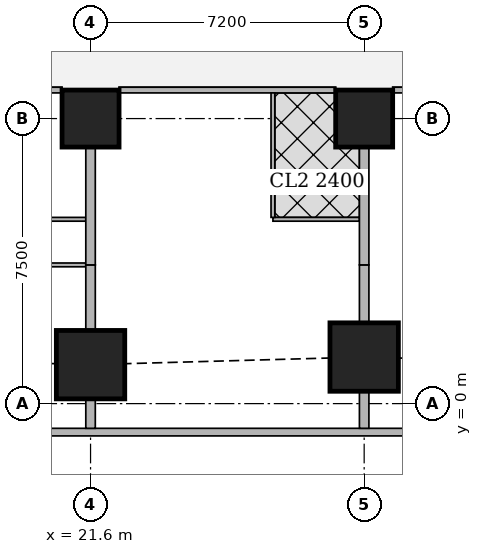
"""IFC4 building model, lengths in metres.
Left out: names, types, materials, properties, quantities, classifications, styles, units other than length and angle.
Written with IfcOpenShell. Run it as: python <this file> out.ifc"""

import sys

from ifc_helpers import new_model, si_unit, direction, frame, frame_2d, origin, origin_2d, place, context, subcontext, project, spatial, rectangle, extrude, element, fill, save


model = new_model("IFC4")
c1 = context("Model", 3, precision=1e-05, world=origin(), true_north=direction((0.0, 1.0)))
c2 = subcontext(c1, "Body", "Model", "MODEL_VIEW")
j1 = project(units=[si_unit("LENGTHUNIT", "METRE"), si_unit("PLANEANGLEUNIT", "RADIAN")], contexts=[c1])
p1 = place(None, origin())
s1 = spatial("IfcSite", under=j1, at=p1, CompositionType="ELEMENT")
p2 = place(p1, origin())
s2 = spatial("IfcBuilding", under=s1, at=p2, CompositionType="ELEMENT")
p3 = place(p2, frame((0.0, 0.0, 169.55)))
s3 = spatial("IfcBuildingStorey", under=s2, at=p3, CompositionType="ELEMENT", Elevation=169.55)
for number, where, z_axis, x_axis in (
    (1, (21.6, 1.025, 0.0), (0.0, 0.0, 1.0), (1.0, 0.0, 0.0)),
    (2, (28.8, 1.225, 0.0), (0.0, 0.0, 1.0), (1.0, 0.0, 0.0)),
):
    element("IfcColumn", number, at=place(p3, frame(where, z_axis=z_axis, x_axis=x_axis)), inside=s3, PredefinedType="COLUMN", context=c2, shape_type="SweptSolid", body=[
        extrude(rectangle(XDim=1.8, YDim=1.8, at=origin_2d()), origin(), (0.0, 0.0, 1.0), 3.75),
    ])
for number, where, z_axis, x_axis in (
    (3, (21.6, 7.5, 0.0), (0.0, 0.0, 1.0), (1.0, 0.0, 0.0)),
    (4, (28.8, 7.5, 0.0), (0.0, 0.0, 1.0), (1.0, 0.0, 0.0)),
):
    element("IfcColumn", number, at=place(p3, frame(where, z_axis=z_axis, x_axis=x_axis)), inside=s3, PredefinedType="COLUMN", context=c2, shape_type="SweptSolid", body=[
        extrude(rectangle(XDim=1.5, YDim=1.5, at=origin_2d()), origin(), (0.0, 0.0, 1.0), 3.75),
    ])
p4 = place(p3, frame((2.163, -0.75, 0.0), z_axis=(0.0, 0.0, 1.0), x_axis=(1.0, 0.0, 0.0)))
e5 = element("IfcWall", 5, at=p4, inside=s3, PredefinedType="SOLIDWALL", context=c2, shape_type="SweptSolid", body=[
    extrude(rectangle(XDim=45.628, YDim=0.2, at=frame_2d((22.814, 0.0))), origin(), (0.0, 0.0, 1.0), 3.5),
])
p5 = place(p4, frame((9.537, 0.0, 0.9)))
e6 = element("IfcOpeningElement", 6, at=p5, cuts=e5, PredefinedType="OPENING", context=c2, shape_type="SweptSolid", body=[
    extrude(rectangle(XDim=1.8, YDim=1.5, at=frame_2d((0.9, 0.75))), frame((0.0, 0.11, 0.0), z_axis=(0.0, -1.0, 0.0), x_axis=(1.0, 0.0, 0.0)), (0.0, 0.0, 1.0), 0.22),
])
p6 = place(p4, frame((13.137, 0.0, 0.9)))
e7 = element("IfcOpeningElement", 7, at=p6, cuts=e5, PredefinedType="OPENING", context=c2, shape_type="SweptSolid", body=[
    extrude(rectangle(XDim=1.8, YDim=1.5, at=frame_2d((0.9, 0.75))), frame((0.0, 0.11, 0.0), z_axis=(0.0, -1.0, 0.0), x_axis=(1.0, 0.0, 0.0)), (0.0, 0.0, 1.0), 0.22),
])
p7 = place(p4, frame((16.737, 0.0, 0.9)))
e8 = element("IfcOpeningElement", 8, at=p7, cuts=e5, PredefinedType="OPENING", context=c2, shape_type="SweptSolid", body=[
    extrude(rectangle(XDim=1.8, YDim=1.5, at=frame_2d((0.9, 0.75))), frame((0.0, 0.11, 0.0), z_axis=(0.0, -1.0, 0.0), x_axis=(1.0, 0.0, 0.0)), (0.0, 0.0, 1.0), 0.22),
])
p8 = place(p4, frame((20.337, 0.0, 0.9)))
e9 = element("IfcOpeningElement", 9, at=p8, cuts=e5, PredefinedType="OPENING", context=c2, shape_type="SweptSolid", body=[
    extrude(rectangle(XDim=1.8, YDim=1.5, at=frame_2d((0.9, 0.75))), frame((0.0, 0.11, 0.0), z_axis=(0.0, -1.0, 0.0), x_axis=(1.0, 0.0, 0.0)), (0.0, 0.0, 1.0), 0.22),
])
p9 = place(p4, frame((23.937, 0.0, 0.9)))
e10 = element("IfcOpeningElement", 10, at=p9, cuts=e5, PredefinedType="OPENING", context=c2, shape_type="SweptSolid", body=[
    extrude(rectangle(XDim=1.8, YDim=1.5, at=frame_2d((0.9, 0.75))), frame((0.0, 0.11, 0.0), z_axis=(0.0, -1.0, 0.0), x_axis=(1.0, 0.0, 0.0)), (0.0, 0.0, 1.0), 0.22),
])
p10 = place(p4, frame((27.537, 0.0, 0.9)))
e11 = element("IfcOpeningElement", 11, at=p10, cuts=e5, PredefinedType="OPENING", context=c2, shape_type="SweptSolid", body=[
    extrude(rectangle(XDim=1.8, YDim=1.5, at=frame_2d((0.9, 0.75))), frame((0.0, 0.11, 0.0), z_axis=(0.0, -1.0, 0.0), x_axis=(1.0, 0.0, 0.0)), (0.0, 0.0, 1.0), 0.22),
])
p11 = place(p4, frame((31.137, 0.0, 0.9)))
e12 = element("IfcOpeningElement", 12, at=p11, cuts=e5, PredefinedType="OPENING", context=c2, shape_type="SweptSolid", body=[
    extrude(rectangle(XDim=1.8, YDim=1.5, at=frame_2d((0.9, 0.75))), frame((0.0, 0.11, 0.0), z_axis=(0.0, -1.0, 0.0), x_axis=(1.0, 0.0, 0.0)), (0.0, 0.0, 1.0), 0.22),
])
p12 = place(p4, frame((34.737, 0.0, 0.9)))
e13 = element("IfcOpeningElement", 13, at=p12, cuts=e5, PredefinedType="OPENING", context=c2, shape_type="SweptSolid", body=[
    extrude(rectangle(XDim=1.8, YDim=1.5, at=frame_2d((0.9, 0.75))), frame((0.0, 0.11, 0.0), z_axis=(0.0, -1.0, 0.0), x_axis=(1.0, 0.0, 0.0)), (0.0, 0.0, 1.0), 0.22),
])
p13 = place(p3, frame((35.249, 8.25, 0.0), z_axis=(0.0, 0.0, 1.0), x_axis=(-1.0, 0.0, 0.0)))
e14 = element("IfcWall", 14, at=p13, inside=s3, PredefinedType="SOLIDWALL", context=c2, shape_type="SweptSolid", body=[
    extrude(rectangle(XDim=5.698, YDim=0.15, at=frame_2d((2.849, 0.0))), origin(), (0.0, 0.0, 1.0), 3.5),
])
p14 = place(p13, frame((3.549, 0.0, 0.0)))
e15 = element("IfcOpeningElement", 15, at=p14, cuts=e14, PredefinedType="OPENING", context=c2, shape_type="SweptSolid", body=[
    extrude(rectangle(XDim=1.0, YDim=2.1, at=frame_2d((0.5, 1.05))), frame((0.0, 0.085, 0.0), z_axis=(0.0, -1.0, 0.0), x_axis=(1.0, 0.0, 0.0)), (0.0, 0.0, 1.0), 0.17),
])
p15 = place(p3, frame((28.049, 8.25, 0.0), z_axis=(0.0, 0.0, 1.0), x_axis=(-1.0, 0.0, 0.0)))
e16 = element("IfcWall", 16, at=p15, inside=s3, PredefinedType="SOLIDWALL", context=c2, shape_type="SweptSolid", body=[
    extrude(rectangle(XDim=5.698, YDim=0.15, at=frame_2d((2.849, 0.0))), origin(), (0.0, 0.0, 1.0), 3.5),
])
p16 = place(p15, frame((3.549, 0.0, 0.0)))
e17 = element("IfcOpeningElement", 17, at=p16, cuts=e16, PredefinedType="OPENING", context=c2, shape_type="SweptSolid", body=[
    extrude(rectangle(XDim=1.0, YDim=2.1, at=frame_2d((0.5, 1.05))), frame((0.0, 0.085, 0.0), z_axis=(0.0, -1.0, 0.0), x_axis=(1.0, 0.0, 0.0)), (0.0, 0.0, 1.0), 0.17),
])
p17 = place(p3, frame((20.849, 8.25, 0.0), z_axis=(0.0, 0.0, 1.0), x_axis=(-1.0, 0.0, 0.0)))
e18 = element("IfcWall", 18, at=p17, inside=s3, PredefinedType="SOLIDWALL", context=c2, shape_type="SweptSolid", body=[
    extrude(rectangle(XDim=5.698, YDim=0.15, at=frame_2d((2.849, 0.0))), origin(), (0.0, 0.0, 1.0), 3.5),
])
p18 = place(p3, frame((21.475, 3.65, 0.0), z_axis=(0.0, 0.0, 1.0), x_axis=(-1.0, 0.0, 0.0)))
e19 = element("IfcWall", 19, at=p18, inside=s3, PredefinedType="PARTITIONING", context=c2, shape_type="SweptSolid", body=[
    extrude(rectangle(XDim=7.075, YDim=0.1, at=frame_2d((3.538, 0.0))), origin(), (0.0, 0.0, 1.0), 3.5),
])
p19 = place(p18, frame((5.975, 0.0, 0.0)))
e20 = element("IfcOpeningElement", 20, at=p19, cuts=e19, PredefinedType="OPENING", context=c2, shape_type="SweptSolid", body=[
    extrude(rectangle(XDim=0.9, YDim=2.1, at=frame_2d((0.45, 1.05))), frame((0.0, 0.06, 0.0), z_axis=(0.0, -1.0, 0.0), x_axis=(1.0, 0.0, 0.0)), (0.0, 0.0, 1.0), 0.12),
])
p20 = place(p18, frame((2.375, 0.0, 0.0)))
e21 = element("IfcOpeningElement", 21, at=p20, cuts=e19, PredefinedType="OPENING", context=c2, shape_type="SweptSolid", body=[
    extrude(rectangle(XDim=0.9, YDim=2.1, at=frame_2d((0.45, 1.05))), frame((0.0, 0.06, 0.0), z_axis=(0.0, -1.0, 0.0), x_axis=(1.0, 0.0, 0.0)), (0.0, 0.0, 1.0), 0.12),
])
p21 = place(p3, frame((21.475, 4.85, 0.0), z_axis=(0.0, 0.0, 1.0), x_axis=(-1.0, 0.0, 0.0)))
e22 = element("IfcWall", 22, at=p21, inside=s3, PredefinedType="PARTITIONING", context=c2, shape_type="SweptSolid", body=[
    extrude(rectangle(XDim=7.075, YDim=0.1, at=frame_2d((3.538, 0.0))), origin(), (0.0, 0.0, 1.0), 3.5),
])
p22 = place(p21, frame((5.52, 0.0, 0.0)))
e23 = element("IfcOpeningElement", 23, at=p22, cuts=e22, PredefinedType="OPENING", context=c2, shape_type="SweptSolid", body=[
    extrude(rectangle(XDim=0.9, YDim=2.1, at=frame_2d((0.45, 1.05))), frame((0.0, 0.06, 0.0), z_axis=(0.0, -1.0, 0.0), x_axis=(1.0, 0.0, 0.0)), (0.0, 0.0, 1.0), 0.12),
])
p23 = place(p21, frame((0.625, 0.0, 0.0)))
e24 = element("IfcOpeningElement", 24, at=p23, cuts=e22, PredefinedType="OPENING", context=c2, shape_type="SweptSolid", body=[
    extrude(rectangle(XDim=0.9, YDim=2.1, at=frame_2d((0.45, 1.05))), frame((0.0, 0.06, 0.0), z_axis=(0.0, -1.0, 0.0), x_axis=(1.0, 0.0, 0.0)), (0.0, 0.0, 1.0), 0.12),
])
p24 = place(p21, frame((3.121, 0.0, 0.0)))
e25 = element("IfcOpeningElement", 25, at=p24, cuts=e22, PredefinedType="OPENING", context=c2, shape_type="SweptSolid", body=[
    extrude(rectangle(XDim=0.9, YDim=2.1, at=frame_2d((0.45, 1.05))), frame((0.0, 0.06, 0.0), z_axis=(0.0, -1.0, 0.0), x_axis=(1.0, 0.0, 0.0)), (0.0, 0.0, 1.0), 0.12),
])
p25 = place(p3, frame((28.675, 4.85, 0.0), z_axis=(0.0, 0.0, 1.0), x_axis=(-1.0, 0.0, 0.0)))
e26 = element("IfcWall", 26, at=p25, inside=s3, PredefinedType="PARTITIONING", context=c2, shape_type="SweptSolid", body=[
    extrude(rectangle(XDim=2.276, YDim=0.1, at=frame_2d((1.138, 0.0))), origin(), (0.0, 0.0, 1.0), 3.5),
])
p26 = place(p25, frame((0.626, 0.0, 0.0)))
e27 = element("IfcOpeningElement", 27, at=p26, cuts=e26, PredefinedType="OPENING", context=c2, shape_type="SweptSolid", body=[
    extrude(rectangle(XDim=0.9, YDim=2.1, at=frame_2d((0.45, 1.05))), frame((0.0, 0.06, 0.0), z_axis=(0.0, -1.0, 0.0), x_axis=(1.0, 0.0, 0.0)), (0.0, 0.0, 1.0), 0.12),
])
p27 = place(p3, frame((26.399, 4.9, 0.0), z_axis=(0.0, 0.0, 1.0), x_axis=(0.0, 1.0, 0.0)))
e28 = element("IfcWall", 28, at=p27, inside=s3, PredefinedType="PARTITIONING", context=c2, shape_type="SweptSolid", body=[
    extrude(rectangle(XDim=3.275, YDim=0.1, at=frame_2d((1.638, 0.0))), origin(), (0.0, 0.0, 1.0), 3.5),
])
p28 = place(p3, frame((21.6, -0.65, 0.0), z_axis=(0.0, 0.0, 1.0), x_axis=(0.0, 1.0, 0.0)))
e29 = element("IfcWall", 29, at=p28, inside=s3, PredefinedType="SOLIDWALL", context=c2, shape_type="SweptSolid", body=[
    extrude(rectangle(XDim=0.774, YDim=0.25, at=frame_2d((0.387, 0.0))), origin(), (0.0, 0.0, 1.0), 2.1),
])
p29 = place(p3, frame((21.6, 1.926, 0.0), z_axis=(0.0, 0.0, 1.0), x_axis=(0.0, 1.0, 0.0)))
e30 = element("IfcWall", 30, at=p29, inside=s3, PredefinedType="SOLIDWALL", context=c2, shape_type="SweptSolid", body=[
    extrude(rectangle(XDim=1.724, YDim=0.25, at=frame_2d((0.862, 0.0))), origin(), (0.0, 0.0, 1.0), 2.1),
])
p30 = place(p3, frame((21.6, 3.65, 0.0), z_axis=(0.0, 0.0, 1.0), x_axis=(0.0, 1.0, 0.0)))
e31 = element("IfcWall", 31, at=p30, inside=s3, PredefinedType="SOLIDWALL", context=c2, shape_type="SweptSolid", body=[
    extrude(rectangle(XDim=3.099, YDim=0.25, at=frame_2d((1.55, 0.0))), origin(), (0.0, 0.0, 1.0), 3.5),
])
p31 = place(p3, frame((28.8, -0.65, 0.0), z_axis=(0.0, 0.0, 1.0), x_axis=(0.0, 1.0, 0.0)))
e32 = element("IfcWall", 32, at=p31, inside=s3, PredefinedType="SOLIDWALL", context=c2, shape_type="SweptSolid", body=[
    extrude(rectangle(XDim=0.974, YDim=0.25, at=frame_2d((0.487, 0.0))), origin(), (0.0, 0.0, 1.0), 2.1),
])
p32 = place(p3, frame((28.8, 2.126, 0.0), z_axis=(0.0, 0.0, 1.0), x_axis=(0.0, 1.0, 0.0)))
e33 = element("IfcWall", 33, at=p32, inside=s3, PredefinedType="SOLIDWALL", context=c2, shape_type="SweptSolid", body=[
    extrude(rectangle(XDim=1.524, YDim=0.25, at=frame_2d((0.762, 0.0))), origin(), (0.0, 0.0, 1.0), 2.1),
])
p33 = place(p3, frame((28.8, 3.65, 0.0), z_axis=(0.0, 0.0, 1.0), x_axis=(0.0, 1.0, 0.0)))
e34 = element("IfcWall", 34, at=p33, inside=s3, PredefinedType="SOLIDWALL", context=c2, shape_type="SweptSolid", body=[
    extrude(rectangle(XDim=3.099, YDim=0.25, at=frame_2d((1.55, 0.0))), origin(), (0.0, 0.0, 1.0), 3.5),
])
p34 = place(p7, origin())
e35 = element("IfcWindow", 35, at=p34, inside=s3, PartitioningType="SINGLE_PANEL", PredefinedType="WINDOW", context=c2, shape_type="SweptSolid", body=[
    extrude(rectangle(XDim=1.8, YDim=1.5, at=frame_2d((0.9, 0.75))), frame((0.0, 0.03, 0.0), z_axis=(0.0, -1.0, 0.0), x_axis=(1.0, 0.0, 0.0)), (0.0, 0.0, 1.0), 0.06),
])
fill(e8, e35)
p35 = place(p8, origin())
e36 = element("IfcWindow", 36, at=p35, inside=s3, PartitioningType="SINGLE_PANEL", PredefinedType="WINDOW", context=c2, shape_type="SweptSolid", body=[
    extrude(rectangle(XDim=1.8, YDim=1.5, at=frame_2d((0.9, 0.75))), frame((0.0, 0.03, 0.0), z_axis=(0.0, -1.0, 0.0), x_axis=(1.0, 0.0, 0.0)), (0.0, 0.0, 1.0), 0.06),
])
fill(e9, e36)
p36 = place(p9, origin())
e37 = element("IfcWindow", 37, at=p36, inside=s3, PartitioningType="SINGLE_PANEL", PredefinedType="WINDOW", context=c2, shape_type="SweptSolid", body=[
    extrude(rectangle(XDim=1.8, YDim=1.5, at=frame_2d((0.9, 0.75))), frame((0.0, 0.03, 0.0), z_axis=(0.0, -1.0, 0.0), x_axis=(1.0, 0.0, 0.0)), (0.0, 0.0, 1.0), 0.06),
])
fill(e10, e37)
p37 = place(p10, origin())
e38 = element("IfcWindow", 38, at=p37, inside=s3, PartitioningType="SINGLE_PANEL", PredefinedType="WINDOW", context=c2, shape_type="SweptSolid", body=[
    extrude(rectangle(XDim=1.8, YDim=1.5, at=frame_2d((0.9, 0.75))), frame((0.0, 0.03, 0.0), z_axis=(0.0, -1.0, 0.0), x_axis=(1.0, 0.0, 0.0)), (0.0, 0.0, 1.0), 0.06),
])
fill(e11, e38)
p38 = place(p23, origin())
e39 = element("IfcDoor", 39, at=p38, inside=s3, OperationType="SINGLE_SWING_RIGHT", PredefinedType="DOOR", context=c2, shape_type="SweptSolid", body=[
    extrude(rectangle(XDim=0.9, YDim=2.1, at=frame_2d((0.45, 1.05))), frame((0.0, 0.025, 0.0), z_axis=(0.0, -1.0, 0.0), x_axis=(1.0, 0.0, 0.0)), (0.0, 0.0, 1.0), 0.05),
])
fill(e24, e39)
p39 = place(p26, origin())
e40 = element("IfcDoor", 40, at=p39, inside=s3, OperationType="SINGLE_SWING_RIGHT", PredefinedType="DOOR", context=c2, shape_type="SweptSolid", body=[
    extrude(rectangle(XDim=0.9, YDim=2.1, at=frame_2d((0.45, 1.05))), frame((0.0, 0.025, 0.0), z_axis=(0.0, -1.0, 0.0), x_axis=(1.0, 0.0, 0.0)), (0.0, 0.0, 1.0), 0.05),
])
fill(e27, e40)
p40 = place(p16, origin())
e41 = element("IfcDoor", 41, at=p40, inside=s3, OperationType="SINGLE_SWING_RIGHT", PredefinedType="DOOR", context=c2, shape_type="SweptSolid", body=[
    extrude(rectangle(XDim=1.0, YDim=2.1, at=frame_2d((0.5, 1.05))), frame((0.0, 0.025, 0.0), z_axis=(0.0, -1.0, 0.0), x_axis=(1.0, 0.0, 0.0)), (0.0, 0.0, 1.0), 0.05),
])
fill(e17, e41)
save(model, sys.argv[1])
